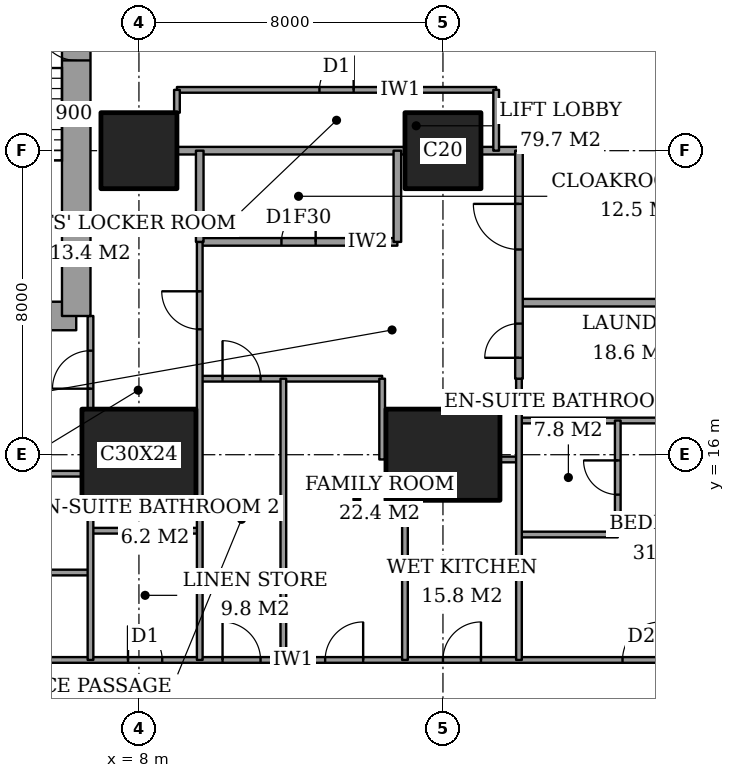
"""IFC4 building model, lengths in metres.
Left out: names, types, materials, properties, quantities, classifications, styles, units other than length and angle.
Written with IfcOpenShell. Run it as: python <this file> out.ifc"""

import sys

from ifc_helpers import new_model, si_unit, direction, frame, frame_2d, origin, origin_2d, place, context, subcontext, project, spatial, rectangle, extrude, element, fill, save


model = new_model("IFC4")
c1 = context("Model", 3, precision=1e-05, world=origin(), true_north=direction((0.0, 1.0)))
c2 = subcontext(c1, "Body", "Model", "MODEL_VIEW")
j1 = project(units=[si_unit("LENGTHUNIT", "METRE"), si_unit("PLANEANGLEUNIT", "RADIAN")], contexts=[c1])
p1 = place(None, origin())
s1 = spatial("IfcSite", under=j1, at=p1, CompositionType="ELEMENT")
p2 = place(p1, origin())
s2 = spatial("IfcBuilding", under=s1, at=p2, CompositionType="ELEMENT")
p3 = place(p2, frame((0.0, 0.0, 161.0)))
s3 = spatial("IfcBuildingStorey", under=s2, at=p3, CompositionType="ELEMENT", Elevation=161.0)
p4 = place(p3, frame((8.0, 16.0, 0.0), z_axis=(0.0, 0.0, 1.0), x_axis=(1.0, 0.0, 0.0)))
e1 = element("IfcColumn", 1, at=p4, inside=s3, PredefinedType="COLUMN", context=c2, shape_type="SweptSolid", body=[
    extrude(rectangle(XDim=3.0, YDim=2.4, at=origin_2d()), origin(), (0.0, 0.0, 1.0), 3.6),
])
p5 = place(p3, frame((8.0, 24.0, 0.0), z_axis=(0.0, 0.0, 1.0), x_axis=(1.0, 0.0, 0.0)))
e2 = element("IfcColumn", 2, at=p5, inside=s3, PredefinedType="COLUMN", context=c2, shape_type="SweptSolid", body=[
    extrude(rectangle(XDim=2.0, YDim=2.0, at=origin_2d()), origin(), (0.0, 0.0, 1.0), 3.6),
])
p6 = place(p3, frame((16.0, 16.0, 0.0), z_axis=(0.0, 0.0, 1.0), x_axis=(1.0, 0.0, 0.0)))
e3 = element("IfcColumn", 3, at=p6, inside=s3, PredefinedType="COLUMN", context=c2, shape_type="SweptSolid", body=[
    extrude(rectangle(XDim=3.0, YDim=2.4, at=origin_2d()), origin(), (0.0, 0.0, 1.0), 3.6),
])
p7 = place(p3, frame((16.0, 24.0, 0.0), z_axis=(0.0, 0.0, 1.0), x_axis=(1.0, 0.0, 0.0)))
e4 = element("IfcColumn", 4, at=p7, inside=s3, PredefinedType="COLUMN", context=c2, shape_type="SweptSolid", body=[
    extrude(rectangle(XDim=2.0, YDim=2.0, at=origin_2d()), origin(), (0.0, 0.0, 1.0), 3.6),
])
p8 = place(p3, frame((1.9, 19.65, 0.0), z_axis=(0.0, 0.0, 1.0), x_axis=(1.0, 0.0, 0.0)))
e5 = element("IfcWall", 5, at=p8, inside=s3, PredefinedType="SHEAR", context=c2, shape_type="SweptSolid", body=[
    extrude(rectangle(XDim=4.45, YDim=0.75, at=frame_2d((2.225, 0.0))), origin(), (0.0, 0.0, 1.0), 3.6),
])
p9 = place(p3, frame((6.35, 19.65, 0.0), z_axis=(0.0, 0.0, 1.0), x_axis=(0.0, 1.0, 0.0)))
e6 = element("IfcWall", 6, at=p9, inside=s3, PredefinedType="SHEAR", context=c2, shape_type="SweptSolid", body=[
    extrude(rectangle(XDim=8.7, YDim=0.75, at=frame_2d((4.35, 0.0))), origin(), (0.0, 0.0, 1.0), 3.6),
])
p10 = place(p9, frame((6.725, 0.0, 0.0)))
e7 = element("IfcOpeningElement", 7, at=p10, cuts=e6, PredefinedType="OPENING", context=c2, shape_type="SweptSolid", body=[
    extrude(rectangle(XDim=1.0, YDim=2.1, at=frame_2d((0.5, 1.05))), frame((0.0, 0.385, 0.0), z_axis=(0.0, -1.0, 0.0), x_axis=(1.0, 0.0, 0.0)), (0.0, 0.0, 1.0), 0.77),
])
p11 = place(p3, frame((-0.45, 10.6, 0.0), z_axis=(0.0, 0.0, 1.0), x_axis=(1.0, 0.0, 0.0)))
e8 = element("IfcWall", 8, at=p11, inside=s3, PredefinedType="PARTITIONING", context=c2, shape_type="SweptSolid", body=[
    extrude(rectangle(XDim=25.011, YDim=0.15, at=frame_2d((12.505, 0.0))), origin(), (0.0, 0.0, 1.0), 3.35),
])
p12 = place(p11, frame((10.65, 0.0, 0.0)))
e9 = element("IfcOpeningElement", 9, at=p12, cuts=e8, PredefinedType="OPENING", context=c2, shape_type="SweptSolid", body=[
    extrude(rectangle(XDim=1.0, YDim=2.1, at=frame_2d((0.5, 1.05))), frame((0.0, 0.085, 0.0), z_axis=(0.0, -1.0, 0.0), x_axis=(1.0, 0.0, 0.0)), (0.0, 0.0, 1.0), 0.17),
])
p13 = place(p11, frame((3.087, 0.0, 0.0)))
e10 = element("IfcOpeningElement", 10, at=p13, cuts=e8, PredefinedType="OPENING", context=c2, shape_type="SweptSolid", body=[
    extrude(rectangle(XDim=1.0, YDim=2.1, at=frame_2d((0.5, 1.05))), frame((0.0, 0.085, 0.0), z_axis=(0.0, -1.0, 0.0), x_axis=(1.0, 0.0, 0.0)), (0.0, 0.0, 1.0), 0.17),
])
p14 = place(p11, frame((8.163, 0.0, 0.0)))
e11 = element("IfcOpeningElement", 11, at=p14, cuts=e8, PredefinedType="OPENING", context=c2, shape_type="SweptSolid", body=[
    extrude(rectangle(XDim=0.9, YDim=2.1, at=frame_2d((0.45, 1.05))), frame((0.0, 0.085, 0.0), z_axis=(0.0, -1.0, 0.0), x_axis=(1.0, 0.0, 0.0)), (0.0, 0.0, 1.0), 0.17),
])
p15 = place(p11, frame((13.35, 0.0, 0.0)))
e12 = element("IfcOpeningElement", 12, at=p15, cuts=e8, PredefinedType="OPENING", context=c2, shape_type="SweptSolid", body=[
    extrude(rectangle(XDim=1.0, YDim=2.1, at=frame_2d((0.5, 1.05))), frame((0.0, 0.085, 0.0), z_axis=(0.0, -1.0, 0.0), x_axis=(1.0, 0.0, 0.0)), (0.0, 0.0, 1.0), 0.17),
])
p16 = place(p11, frame((16.45, 0.0, 0.0)))
e13 = element("IfcOpeningElement", 13, at=p16, cuts=e8, PredefinedType="OPENING", context=c2, shape_type="SweptSolid", body=[
    extrude(rectangle(XDim=1.0, YDim=2.1, at=frame_2d((0.5, 1.05))), frame((0.0, 0.085, 0.0), z_axis=(0.0, -1.0, 0.0), x_axis=(1.0, 0.0, 0.0)), (0.0, 0.0, 1.0), 0.17),
])
p17 = place(p11, frame((21.175, 0.0, 0.0)))
e14 = element("IfcOpeningElement", 14, at=p17, cuts=e8, PredefinedType="OPENING", context=c2, shape_type="SweptSolid", body=[
    extrude(rectangle(XDim=1.0, YDim=2.1, at=frame_2d((0.5, 1.05))), frame((0.0, 0.085, 0.0), z_axis=(0.0, -1.0, 0.0), x_axis=(1.0, 0.0, 0.0)), (0.0, 0.0, 1.0), 0.17),
])
p18 = place(p3, frame((4.325, 12.9, 0.0), z_axis=(0.0, 0.0, 1.0), x_axis=(1.0, 0.0, 0.0)))
e15 = element("IfcWall", 15, at=p18, inside=s3, PredefinedType="PARTITIONING", context=c2, shape_type="SweptSolid", body=[
    extrude(rectangle(XDim=2.4, YDim=0.15, at=frame_2d((1.2, 0.0))), origin(), (0.0, 0.0, 1.0), 3.35),
])
p19 = place(p3, frame((18.0, 13.9, 0.0), z_axis=(0.0, 0.0, 1.0), x_axis=(1.0, 0.0, 0.0)))
e16 = element("IfcWall", 16, at=p19, inside=s3, PredefinedType="PARTITIONING", context=c2, shape_type="SweptSolid", body=[
    extrude(rectangle(XDim=2.6, YDim=0.15, at=frame_2d((1.3, 0.0))), origin(), (0.0, 0.0, 1.0), 3.35),
])
p20 = place(p3, frame((6.725, 14.0, 0.0), z_axis=(0.0, 0.0, 1.0), x_axis=(1.0, 0.0, 0.0)))
e17 = element("IfcWall", 17, at=p20, inside=s3, PredefinedType="PARTITIONING", context=c2, shape_type="SweptSolid", body=[
    extrude(rectangle(XDim=2.875, YDim=0.15, at=frame_2d((1.438, 0.0))), origin(), (0.0, 0.0, 1.0), 3.35),
])
p21 = place(p3, frame((1.35, 15.5, 0.0), z_axis=(0.0, 0.0, 1.0), x_axis=(1.0, 0.0, 0.0)))
e18 = element("IfcWall", 18, at=p21, inside=s3, PredefinedType="PARTITIONING", context=c2, shape_type="SweptSolid", body=[
    extrude(rectangle(XDim=5.15, YDim=0.15, at=frame_2d((2.575, 0.0))), origin(), (0.0, 0.0, 1.0), 3.35),
])
p22 = place(p3, frame((17.5, 15.875, 0.0), z_axis=(0.0, 0.0, 1.0), x_axis=(1.0, 0.0, 0.0)))
e19 = element("IfcWall", 19, at=p22, inside=s3, PredefinedType="PARTITIONING", context=c2, shape_type="SweptSolid", body=[
    extrude(rectangle(XDim=0.5, YDim=0.15, at=frame_2d((0.25, 0.0))), origin(), (0.0, 0.0, 1.0), 2.634),
])
p23 = place(p3, frame((18.0, 16.9, 0.0), z_axis=(0.0, 0.0, 1.0), x_axis=(1.0, 0.0, 0.0)))
e20 = element("IfcWall", 20, at=p23, inside=s3, PredefinedType="PARTITIONING", context=c2, shape_type="SweptSolid", body=[
    extrude(rectangle(XDim=6.0, YDim=0.15, at=frame_2d((3.0, 0.0))), origin(), (0.0, 0.0, 1.0), 3.35),
])
p24 = place(p3, frame((9.6, 18.0, 0.0), z_axis=(0.0, 0.0, 1.0), x_axis=(1.0, 0.0, 0.0)))
e21 = element("IfcWall", 21, at=p24, inside=s3, PredefinedType="PARTITIONING", context=c2, shape_type="SweptSolid", body=[
    extrude(rectangle(XDim=4.8, YDim=0.15, at=frame_2d((2.4, 0.0))), origin(), (0.0, 0.0, 1.0), 3.35),
])
p25 = place(p24, frame((0.6, 0.0, 0.0)))
e22 = element("IfcOpeningElement", 22, at=p25, cuts=e21, PredefinedType="OPENING", context=c2, shape_type="SweptSolid", body=[
    extrude(rectangle(XDim=1.0, YDim=2.1, at=frame_2d((0.5, 1.05))), frame((0.0, 0.085, 0.0), z_axis=(0.0, -1.0, 0.0), x_axis=(1.0, 0.0, 0.0)), (0.0, 0.0, 1.0), 0.17),
])
p26 = place(p3, frame((18.0, 20.0, 0.0), z_axis=(0.0, 0.0, 1.0), x_axis=(1.0, 0.0, 0.0)))
e23 = element("IfcWall", 23, at=p26, inside=s3, PredefinedType="PARTITIONING", context=c2, shape_type="SweptSolid", body=[
    extrude(rectangle(XDim=6.0, YDim=0.2, at=frame_2d((3.0, 0.0))), origin(), (0.0, 0.0, 1.0), 3.35),
])
p27 = place(p3, frame((9.6, 21.6, 0.0), z_axis=(0.0, 0.0, 1.0), x_axis=(1.0, 0.0, 0.0)))
e24 = element("IfcWall", 24, at=p27, inside=s3, PredefinedType="PARTITIONING", context=c2, shape_type="SweptSolid", body=[
    extrude(rectangle(XDim=5.2, YDim=0.2, at=frame_2d((2.6, 0.0))), origin(), (0.0, 0.0, 1.0), 3.35),
])
p28 = place(p27, frame((2.15, 0.0, 0.0)))
e25 = element("IfcOpeningElement", 25, at=p28, cuts=e24, PredefinedType="OPENING", context=c2, shape_type="SweptSolid", body=[
    extrude(rectangle(XDim=0.9, YDim=2.1, at=frame_2d((0.45, 1.05))), frame((0.0, 0.11, 0.0), z_axis=(0.0, -1.0, 0.0), x_axis=(1.0, 0.0, 0.0)), (0.0, 0.0, 1.0), 0.22),
])
p29 = place(p3, frame((9.0, 24.0, 0.0), z_axis=(0.0, 0.0, 1.0), x_axis=(1.0, 0.0, 0.0)))
e26 = element("IfcWall", 26, at=p29, inside=s3, PredefinedType="PARTITIONING", context=c2, shape_type="SweptSolid", body=[
    extrude(rectangle(XDim=6.0, YDim=0.2, at=frame_2d((3.0, 0.0))), origin(), (0.0, 0.0, 1.0), 3.35),
])
p30 = place(p3, frame((17.0, 24.0, 0.0), z_axis=(0.0, 0.0, 1.0), x_axis=(1.0, 0.0, 0.0)))
e27 = element("IfcWall", 27, at=p30, inside=s3, PredefinedType="PARTITIONING", context=c2, shape_type="SweptSolid", body=[
    extrude(rectangle(XDim=1.0, YDim=0.2, at=frame_2d((0.5, 0.0))), origin(), (0.0, 0.0, 1.0), 3.35),
])
p31 = place(p3, frame((9.0, 25.6, 0.0), z_axis=(0.0, 0.0, 1.0), x_axis=(1.0, 0.0, 0.0)))
e28 = element("IfcWall", 28, at=p31, inside=s3, PredefinedType="PARTITIONING", context=c2, shape_type="SweptSolid", body=[
    extrude(rectangle(XDim=8.4, YDim=0.15, at=frame_2d((4.2, 0.0))), origin(), (0.0, 0.0, 1.0), 3.35),
])
p32 = place(p31, frame((3.75, 0.0, 0.0)))
e29 = element("IfcOpeningElement", 29, at=p32, cuts=e28, PredefinedType="OPENING", context=c2, shape_type="SweptSolid", body=[
    extrude(rectangle(XDim=0.9, YDim=2.1, at=frame_2d((0.45, 1.05))), frame((0.0, 0.085, 0.0), z_axis=(0.0, -1.0, 0.0), x_axis=(1.0, 0.0, 0.0)), (0.0, 0.0, 1.0), 0.17),
])
p33 = place(p3, frame((6.725, 10.6, 0.0), z_axis=(0.0, 0.0, 1.0), x_axis=(0.0, 1.0, 0.0)))
e30 = element("IfcWall", 30, at=p33, inside=s3, PredefinedType="PARTITIONING", context=c2, shape_type="SweptSolid", body=[
    extrude(rectangle(XDim=4.2, YDim=0.15, at=frame_2d((2.1, 0.0))), origin(), (0.0, 0.0, 1.0), 3.35),
])
p34 = place(p3, frame((6.725, 17.2, 0.0), z_axis=(0.0, 0.0, 1.0), x_axis=(0.0, 1.0, 0.0)))
e31 = element("IfcWall", 31, at=p34, inside=s3, PredefinedType="PARTITIONING", context=c2, shape_type="SweptSolid", body=[
    extrude(rectangle(XDim=2.45, YDim=0.15, at=frame_2d((1.225, 0.0))), origin(), (0.0, 0.0, 1.0), 3.35),
])
p35 = place(p34, frame((0.538, 0.0, 0.0)))
e32 = element("IfcOpeningElement", 32, at=p35, cuts=e31, PredefinedType="OPENING", context=c2, shape_type="SweptSolid", body=[
    extrude(rectangle(XDim=1.0, YDim=2.1, at=frame_2d((0.5, 1.05))), frame((0.0, 0.085, 0.0), z_axis=(0.0, -1.0, 0.0), x_axis=(1.0, 0.0, 0.0)), (0.0, 0.0, 1.0), 0.17),
])
p36 = place(p3, frame((9.0, 25.0, 0.0), z_axis=(0.0, 0.0, 1.0), x_axis=(0.0, 1.0, 0.0)))
e33 = element("IfcWall", 33, at=p36, inside=s3, PredefinedType="PARTITIONING", context=c2, shape_type="SweptSolid", body=[
    extrude(rectangle(XDim=0.6, YDim=0.15, at=frame_2d((0.3, 0.0))), origin(), (0.0, 0.0, 1.0), 3.35),
])
p37 = place(p3, frame((9.6, 21.6, 0.0), z_axis=(0.0, 0.0, 1.0), x_axis=(0.0, 1.0, 0.0)))
e34 = element("IfcWall", 34, at=p37, inside=s3, PredefinedType="PARTITIONING", context=c2, shape_type="SweptSolid", body=[
    extrude(rectangle(XDim=2.4, YDim=0.2, at=frame_2d((1.2, 0.0))), origin(), (0.0, 0.0, 1.0), 3.35),
])
p38 = place(p3, frame((9.6, 10.6, 0.0), z_axis=(0.0, 0.0, 1.0), x_axis=(0.0, 1.0, 0.0)))
e35 = element("IfcWall", 35, at=p38, inside=s3, PredefinedType="PARTITIONING", context=c2, shape_type="SweptSolid", body=[
    extrude(rectangle(XDim=11.0, YDim=0.15, at=frame_2d((5.5, 0.0))), origin(), (0.0, 0.0, 1.0), 3.35),
])
p39 = place(p38, frame((8.7, 0.0, 0.0)))
e36 = element("IfcOpeningElement", 36, at=p39, cuts=e35, PredefinedType="OPENING", context=c2, shape_type="SweptSolid", body=[
    extrude(rectangle(XDim=1.0, YDim=2.1, at=frame_2d((0.5, 1.05))), frame((0.0, 0.085, 0.0), z_axis=(0.0, -1.0, 0.0), x_axis=(1.0, 0.0, 0.0)), (0.0, 0.0, 1.0), 0.17),
])
p40 = place(p3, frame((11.8, 10.6, 0.0), z_axis=(0.0, 0.0, 1.0), x_axis=(0.0, 1.0, 0.0)))
e37 = element("IfcWall", 37, at=p40, inside=s3, PredefinedType="PARTITIONING", context=c2, shape_type="SweptSolid", body=[
    extrude(rectangle(XDim=7.4, YDim=0.15, at=frame_2d((3.7, 0.0))), origin(), (0.0, 0.0, 1.0), 3.35),
])
p41 = place(p3, frame((14.4, 15.875, 0.0), z_axis=(0.0, 0.0, 1.0), x_axis=(0.0, 1.0, 0.0)))
e38 = element("IfcWall", 38, at=p41, inside=s3, PredefinedType="PARTITIONING", context=c2, shape_type="SweptSolid", body=[
    extrude(rectangle(XDim=2.125, YDim=0.15, at=frame_2d((1.062, 0.0))), origin(), (0.0, 0.0, 1.0), 3.35),
])
p42 = place(p3, frame((14.8, 21.6, 0.0), z_axis=(0.0, 0.0, 1.0), x_axis=(0.0, 1.0, 0.0)))
e39 = element("IfcWall", 39, at=p42, inside=s3, PredefinedType="PARTITIONING", context=c2, shape_type="SweptSolid", body=[
    extrude(rectangle(XDim=2.4, YDim=0.2, at=frame_2d((1.2, 0.0))), origin(), (0.0, 0.0, 1.0), 3.35),
])
p43 = place(p3, frame((15.0, 10.6, 0.0), z_axis=(0.0, 0.0, 1.0), x_axis=(0.0, 1.0, 0.0)))
e40 = element("IfcWall", 40, at=p43, inside=s3, PredefinedType="PARTITIONING", context=c2, shape_type="SweptSolid", body=[
    extrude(rectangle(XDim=4.2, YDim=0.15, at=frame_2d((2.1, 0.0))), origin(), (0.0, 0.0, 1.0), 3.35),
])
p44 = place(p3, frame((17.4, 24.0, 0.0), z_axis=(0.0, 0.0, 1.0), x_axis=(0.0, 1.0, 0.0)))
e41 = element("IfcWall", 41, at=p44, inside=s3, PredefinedType="PARTITIONING", context=c2, shape_type="SweptSolid", body=[
    extrude(rectangle(XDim=1.6, YDim=0.15, at=frame_2d((0.8, 0.0))), origin(), (0.0, 0.0, 1.0), 3.35),
])
p45 = place(p3, frame((18.0, 18.0, 0.0), z_axis=(0.0, 0.0, 1.0), x_axis=(0.0, 1.0, 0.0)))
e42 = element("IfcWall", 42, at=p45, inside=s3, PredefinedType="PARTITIONING", context=c2, shape_type="SweptSolid", body=[
    extrude(rectangle(XDim=6.0, YDim=0.2, at=frame_2d((3.0, 0.0))), origin(), (0.0, 0.0, 1.0), 3.35),
])
p46 = place(p45, frame((3.4, 0.0, 0.0)))
e43 = element("IfcOpeningElement", 43, at=p46, cuts=e42, PredefinedType="OPENING", context=c2, shape_type="SweptSolid", body=[
    extrude(rectangle(XDim=1.2, YDim=2.4, at=frame_2d((0.6, 1.2))), frame((0.0, 0.11, 0.0), z_axis=(0.0, -1.0, 0.0), x_axis=(1.0, 0.0, 0.0)), (0.0, 0.0, 1.0), 0.22),
])
p47 = place(p45, frame((0.55, 0.0, 0.0)))
e44 = element("IfcOpeningElement", 44, at=p47, cuts=e42, PredefinedType="OPENING", context=c2, shape_type="SweptSolid", body=[
    extrude(rectangle(XDim=0.9, YDim=2.1, at=frame_2d((0.45, 1.05))), frame((0.0, 0.11, 0.0), z_axis=(0.0, -1.0, 0.0), x_axis=(1.0, 0.0, 0.0)), (0.0, 0.0, 1.0), 0.22),
])
p48 = place(p3, frame((18.0, 10.6, 0.0), z_axis=(0.0, 0.0, 1.0), x_axis=(0.0, 1.0, 0.0)))
e45 = element("IfcWall", 45, at=p48, inside=s3, PredefinedType="PARTITIONING", context=c2, shape_type="SweptSolid", body=[
    extrude(rectangle(XDim=7.4, YDim=0.15, at=frame_2d((3.7, 0.0))), origin(), (0.0, 0.0, 1.0), 3.35),
])
p49 = place(p3, frame((20.6, 13.9, 0.0), z_axis=(0.0, 0.0, 1.0), x_axis=(0.0, 1.0, 0.0)))
e46 = element("IfcWall", 46, at=p49, inside=s3, PredefinedType="PARTITIONING", context=c2, shape_type="SweptSolid", body=[
    extrude(rectangle(XDim=3.0, YDim=0.15, at=frame_2d((1.5, 0.0))), origin(), (0.0, 0.0, 1.0), 3.35),
])
p50 = place(p49, frame((1.05, 0.0, 0.0)))
e47 = element("IfcOpeningElement", 47, at=p50, cuts=e46, PredefinedType="OPENING", context=c2, shape_type="SweptSolid", body=[
    extrude(rectangle(XDim=0.9, YDim=2.1, at=frame_2d((0.45, 1.05))), frame((0.0, 0.085, 0.0), z_axis=(0.0, -1.0, 0.0), x_axis=(1.0, 0.0, 0.0)), (0.0, 0.0, 1.0), 0.17),
])
p51 = place(p12, origin())
e48 = element("IfcDoor", 48, at=p51, inside=s3, OperationType="SINGLE_SWING_RIGHT", PredefinedType="DOOR", context=c2, shape_type="SweptSolid", body=[
    extrude(rectangle(XDim=1.0, YDim=2.1, at=frame_2d((0.5, 1.05))), frame((0.0, 0.025, 0.0), z_axis=(0.0, -1.0, 0.0), x_axis=(1.0, 0.0, 0.0)), (0.0, 0.0, 1.0), 0.05),
])
fill(e9, e48)
p52 = place(p35, origin())
e49 = element("IfcDoor", 49, at=p52, inside=s3, OperationType="SINGLE_SWING_RIGHT", PredefinedType="DOOR", context=c2, shape_type="SweptSolid", body=[
    extrude(rectangle(XDim=1.0, YDim=2.1, at=frame_2d((0.5, 1.05))), frame((0.0, 0.025, 0.0), z_axis=(0.0, -1.0, 0.0), x_axis=(1.0, 0.0, 0.0)), (0.0, 0.0, 1.0), 0.05),
])
fill(e32, e49)
p53 = place(p14, origin())
e50 = element("IfcDoor", 50, at=p53, inside=s3, OperationType="SINGLE_SWING_RIGHT", PredefinedType="DOOR", context=c2, shape_type="SweptSolid", body=[
    extrude(rectangle(XDim=0.9, YDim=2.1, at=frame_2d((0.45, 1.05))), frame((0.0, 0.025, 0.0), z_axis=(0.0, -1.0, 0.0), x_axis=(1.0, 0.0, 0.0)), (0.0, 0.0, 1.0), 0.05),
])
fill(e11, e50)
p54 = place(p39, origin())
e51 = element("IfcDoor", 51, at=p54, inside=s3, OperationType="SINGLE_SWING_LEFT", PredefinedType="DOOR", context=c2, shape_type="SweptSolid", body=[
    extrude(rectangle(XDim=1.0, YDim=2.1, at=frame_2d((0.5, 1.05))), frame((0.0, 0.025, 0.0), z_axis=(0.0, -1.0, 0.0), x_axis=(1.0, 0.0, 0.0)), (0.0, 0.0, 1.0), 0.05),
])
fill(e36, e51)
p55 = place(p28, origin())
e52 = element("IfcDoor", 52, at=p55, inside=s3, OperationType="SINGLE_SWING_LEFT", PredefinedType="DOOR", context=c2, shape_type="SweptSolid", body=[
    extrude(rectangle(XDim=0.9, YDim=2.1, at=frame_2d((0.45, 1.05))), frame((0.0, 0.025, 0.0), z_axis=(0.0, -1.0, 0.0), x_axis=(1.0, 0.0, 0.0)), (0.0, 0.0, 1.0), 0.05),
])
fill(e25, e52)
p56 = place(p46, origin())
e53 = element("IfcDoor", 53, at=p56, inside=s3, OperationType="SINGLE_SWING_LEFT", PredefinedType="DOOR", context=c2, shape_type="SweptSolid", body=[
    extrude(rectangle(XDim=1.2, YDim=2.4, at=frame_2d((0.6, 1.2))), frame((0.0, 0.025, 0.0), z_axis=(0.0, -1.0, 0.0), x_axis=(1.0, 0.0, 0.0)), (0.0, 0.0, 1.0), 0.05),
])
fill(e43, e53)
p57 = place(p25, origin())
e54 = element("IfcDoor", 54, at=p57, inside=s3, OperationType="SINGLE_SWING_RIGHT", PredefinedType="DOOR", context=c2, shape_type="SweptSolid", body=[
    extrude(rectangle(XDim=1.0, YDim=2.1, at=frame_2d((0.5, 1.05))), frame((0.0, 0.025, 0.0), z_axis=(0.0, -1.0, 0.0), x_axis=(1.0, 0.0, 0.0)), (0.0, 0.0, 1.0), 0.05),
])
fill(e22, e54)
p58 = place(p15, origin())
e55 = element("IfcDoor", 55, at=p58, inside=s3, OperationType="SINGLE_SWING_LEFT", PredefinedType="DOOR", context=c2, shape_type="SweptSolid", body=[
    extrude(rectangle(XDim=1.0, YDim=2.1, at=frame_2d((0.5, 1.05))), frame((0.0, 0.025, 0.0), z_axis=(0.0, -1.0, 0.0), x_axis=(1.0, 0.0, 0.0)), (0.0, 0.0, 1.0), 0.05),
])
fill(e12, e55)
p59 = place(p16, origin())
e56 = element("IfcDoor", 56, at=p59, inside=s3, OperationType="SINGLE_SWING_LEFT", PredefinedType="DOOR", context=c2, shape_type="SweptSolid", body=[
    extrude(rectangle(XDim=1.0, YDim=2.1, at=frame_2d((0.5, 1.05))), frame((0.0, 0.025, 0.0), z_axis=(0.0, -1.0, 0.0), x_axis=(1.0, 0.0, 0.0)), (0.0, 0.0, 1.0), 0.05),
])
fill(e13, e56)
p60 = place(p50, origin())
e57 = element("IfcDoor", 57, at=p60, inside=s3, OperationType="SINGLE_SWING_LEFT", PredefinedType="DOOR", context=c2, shape_type="SweptSolid", body=[
    extrude(rectangle(XDim=0.9, YDim=2.1, at=frame_2d((0.45, 1.05))), frame((0.0, 0.025, 0.0), z_axis=(0.0, -1.0, 0.0), x_axis=(1.0, 0.0, 0.0)), (0.0, 0.0, 1.0), 0.05),
])
fill(e47, e57)
p61 = place(p17, origin())
e58 = element("IfcDoor", 58, at=p61, inside=s3, OperationType="SINGLE_SWING_LEFT", PredefinedType="DOOR", context=c2, shape_type="SweptSolid", body=[
    extrude(rectangle(XDim=1.0, YDim=2.1, at=frame_2d((0.5, 1.05))), frame((0.0, 0.025, 0.0), z_axis=(0.0, -1.0, 0.0), x_axis=(1.0, 0.0, 0.0)), (0.0, 0.0, 1.0), 0.05),
])
fill(e14, e58)
p62 = place(p47, origin())
e59 = element("IfcDoor", 59, at=p62, inside=s3, OperationType="SINGLE_SWING_RIGHT", PredefinedType="DOOR", context=c2, shape_type="SweptSolid", body=[
    extrude(rectangle(XDim=0.9, YDim=2.1, at=frame_2d((0.45, 1.05))), frame((0.0, 0.025, 0.0), z_axis=(0.0, -1.0, 0.0), x_axis=(1.0, 0.0, 0.0)), (0.0, 0.0, 1.0), 0.05),
])
fill(e44, e59)
p63 = place(p32, origin())
e60 = element("IfcDoor", 60, at=p63, inside=s3, OperationType="SINGLE_SWING_LEFT", PredefinedType="DOOR", context=c2, shape_type="SweptSolid", body=[
    extrude(rectangle(XDim=0.9, YDim=2.1, at=frame_2d((0.45, 1.05))), frame((0.0, 0.025, 0.0), z_axis=(0.0, -1.0, 0.0), x_axis=(1.0, 0.0, 0.0)), (0.0, 0.0, 1.0), 0.05),
])
fill(e29, e60)
p64 = place(p10, origin())
e61 = element("IfcDoor", 61, at=p64, inside=s3, OperationType="SINGLE_SWING_LEFT", PredefinedType="DOOR", context=c2, shape_type="SweptSolid", body=[
    extrude(rectangle(XDim=1.0, YDim=2.1, at=frame_2d((0.5, 1.05))), frame((0.0, 0.025, 0.0), z_axis=(0.0, -1.0, 0.0), x_axis=(1.0, 0.0, 0.0)), (0.0, 0.0, 1.0), 0.05),
])
fill(e7, e61)
save(model, sys.argv[1])
